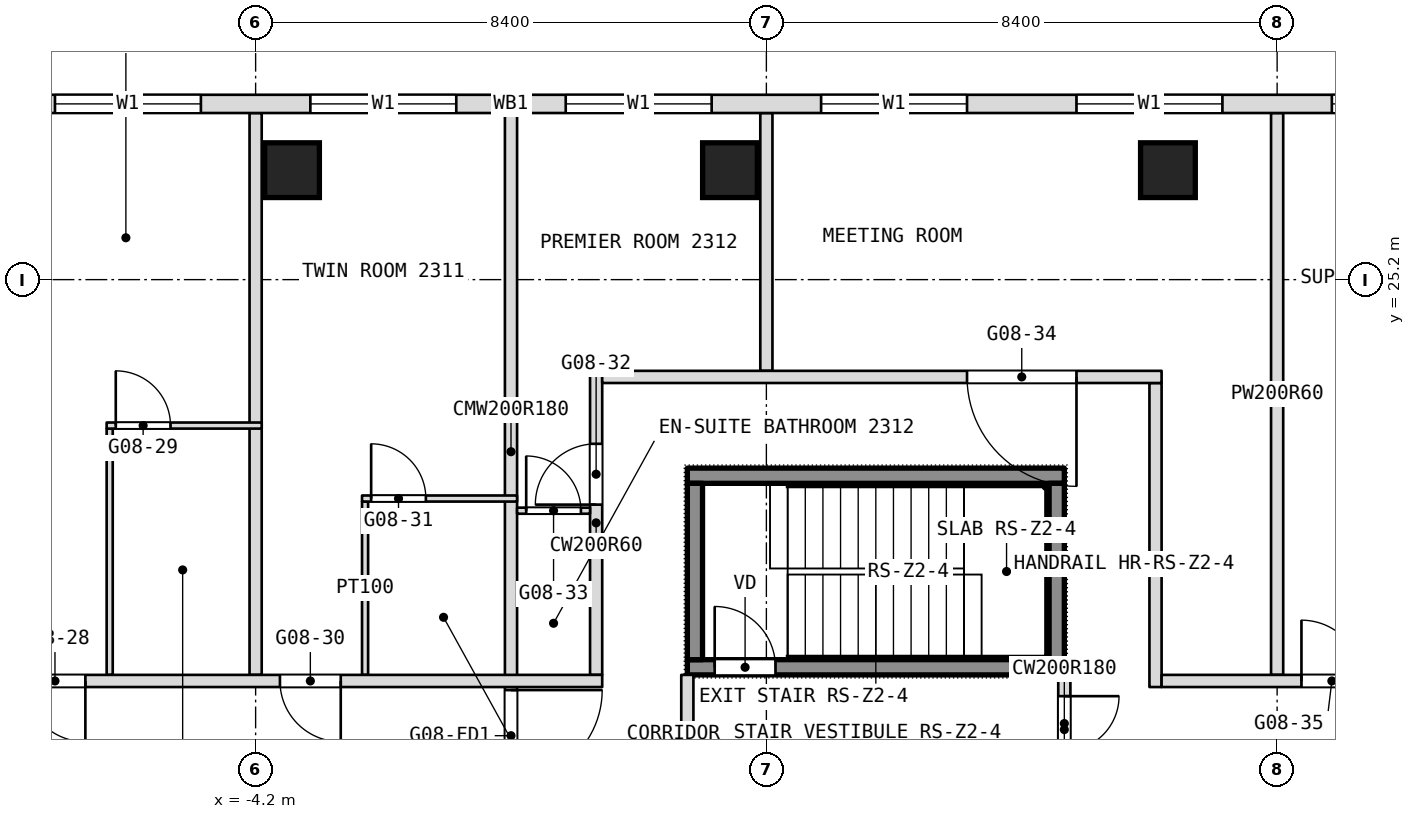
"""IFC4 building model, lengths in metres.
Left out: names, types, materials, properties, quantities, classifications, styles, units other than length and angle.
Written with IfcOpenShell. Run it as: python <this file> out.ifc"""

import sys

from ifc_helpers import new_model, si_unit, direction, frame, frame_2d, origin, origin_2d, place, context, subcontext, project, spatial, rectangle, extrude, element, fill, save


model = new_model("IFC4")
c1 = context("Model", 3, precision=1e-05, world=origin(), true_north=direction((0.0, 1.0)))
c2 = subcontext(c1, "Body", "Model", "MODEL_VIEW")
j1 = project(units=[si_unit("LENGTHUNIT", "METRE"), si_unit("PLANEANGLEUNIT", "RADIAN")], contexts=[c1])
p1 = place(None, origin())
s1 = spatial("IfcSite", under=j1, at=p1, CompositionType="ELEMENT")
p2 = place(p1, origin())
s2 = spatial("IfcBuilding", under=s1, at=p2, CompositionType="ELEMENT")
p3 = place(p2, frame((0.0, 0.0, 108.5)))
s3 = spatial("IfcBuildingStorey", under=s2, at=p3, CompositionType="ELEMENT", Elevation=108.5)
for number, where, z_axis, x_axis in (
    (1, (-3.601, 27.0, 0.0), (0.0, 0.0, 1.0), (1.0, 0.0, 0.0)),
    (2, (3.601, 27.0, 0.0), (0.0, 0.0, 1.0), (1.0, 0.0, 0.0)),
    (3, (10.804, 27.0, 0.0), (0.0, 0.0, 1.0), (1.0, 0.0, 0.0)),
):
    element("IfcColumn", number, at=place(p3, frame(where, z_axis=z_axis, x_axis=x_axis)), inside=s3, PredefinedType="COLUMN", context=c2, shape_type="SweptSolid", body=[
        extrude(rectangle(XDim=0.9, YDim=0.9, at=origin_2d()), origin(), (0.0, 0.0, 1.0), 3.6),
    ])
p4 = place(p3, frame((12.6, 18.7, 0.0), z_axis=(0.0, 0.0, 1.0), x_axis=(0.0, 1.0, 0.0)))
e4 = element("IfcWall", 4, at=p4, inside=s3, PredefinedType="PARTITIONING", context=c2, shape_type="SweptSolid", body=[
    extrude(rectangle(XDim=9.24, YDim=0.2, at=frame_2d((4.62, 0.0))), origin(), (0.0, 0.0, 1.0), 3.34),
])
p5 = place(p3, frame((10.6, 18.5, 0.0), z_axis=(0.0, 0.0, 1.0), x_axis=(0.0, 1.0, 0.0)))
e5 = element("IfcWall", 5, at=p5, inside=s3, PredefinedType="PARTITIONING", context=c2, shape_type="SweptSolid", body=[
    extrude(rectangle(XDim=5.0, YDim=0.2, at=frame_2d((2.5, 0.0))), origin(), (0.0, 0.0, 1.0), 3.34),
])
p6 = place(p3, frame((9.1, 16.9, 0.0), z_axis=(0.0, 0.0, 1.0), x_axis=(0.0, 1.0, 0.0)))
e6 = element("IfcWall", 6, at=p6, inside=s3, PredefinedType="PARTITIONING", context=c2, shape_type="SweptSolid", body=[
    extrude(rectangle(XDim=1.8, YDim=0.2, at=frame_2d((0.9, 0.0))), origin(), (0.0, 0.0, 1.0), 3.34),
])
p7 = place(p6, frame((0.55, 0.0, 0.0)))
e7 = element("IfcOpeningElement", 7, at=p7, cuts=e6, PredefinedType="OPENING", context=c2, shape_type="SweptSolid", body=[
    extrude(rectangle(XDim=0.9, YDim=2.1, at=frame_2d((0.45, 1.05))), frame((0.0, 0.1, 0.0), z_axis=(0.0, -1.0, 0.0), x_axis=(1.0, 0.0, 0.0)), (0.0, 0.0, 1.0), 0.2),
])
p8 = place(p3, frame((4.2, 23.7, 0.0), z_axis=(0.0, 0.0, 1.0), x_axis=(0.0, 1.0, 0.0)))
e8 = element("IfcWall", 8, at=p8, inside=s3, PredefinedType="PARTITIONING", context=c2, shape_type="SweptSolid", body=[
    extrude(rectangle(XDim=4.24, YDim=0.2, at=frame_2d((2.12, 0.0))), origin(), (0.0, 0.0, 1.0), 3.34),
])
p9 = place(p3, frame((2.9, 16.9, 0.0), z_axis=(0.0, 0.0, 1.0), x_axis=(0.0, 1.0, 0.0)))
e9 = element("IfcWall", 9, at=p9, inside=s3, PredefinedType="PARTITIONING", context=c2, shape_type="SweptSolid", body=[
    extrude(rectangle(XDim=1.8, YDim=0.2, at=frame_2d((0.9, 0.0))), origin(), (0.0, 0.0, 1.0), 3.34),
])
p10 = place(p3, frame((1.4, 18.7, 0.0), z_axis=(0.0, 0.0, 1.0), x_axis=(0.0, 1.0, 0.0)))
e10 = element("IfcWall", 10, at=p10, inside=s3, PredefinedType="PARTITIONING", context=c2, shape_type="SweptSolid", body=[
    extrude(rectangle(XDim=5.0, YDim=0.2, at=frame_2d((2.5, 0.0))), origin(), (0.0, 0.0, 1.0), 3.34),
])
p11 = place(p10, frame((2.8, 0.0, 0.0)))
e11 = element("IfcOpeningElement", 11, at=p11, cuts=e10, PredefinedType="OPENING", context=c2, shape_type="SweptSolid", body=[
    extrude(rectangle(XDim=1.0, YDim=2.1, at=frame_2d((0.5, 1.05))), frame((0.0, 0.1, 0.0), z_axis=(0.0, -1.0, 0.0), x_axis=(1.0, 0.0, 0.0)), (0.0, 0.0, 1.0), 0.2),
])
p12 = place(p3, frame((0.0, 16.8, 0.0), z_axis=(0.0, 0.0, 1.0), x_axis=(0.0, 1.0, 0.0)))
e12 = element("IfcWall", 12, at=p12, inside=s3, PredefinedType="PARTITIONING", context=c2, shape_type="SweptSolid", body=[
    extrude(rectangle(XDim=11.14, YDim=0.2, at=frame_2d((5.57, 0.0))), origin(), (0.0, 0.0, 1.0), 3.34),
])
p13 = place(p12, frame((0.15, 0.0, 0.0)))
e13 = element("IfcOpeningElement", 13, at=p13, cuts=e12, PredefinedType="OPENING", context=c2, shape_type="SweptSolid", body=[
    extrude(rectangle(XDim=1.5, YDim=2.1, at=frame_2d((0.75, 1.05))), frame((0.0, 0.1, 0.0), z_axis=(0.0, -1.0, 0.0), x_axis=(1.0, 0.0, 0.0)), (0.0, 0.0, 1.0), 0.2),
])
p14 = place(p3, frame((-2.4, 18.7, 0.0), z_axis=(0.0, 0.0, 1.0), x_axis=(0.0, 1.0, 0.0)))
e14 = element("IfcWall", 14, at=p14, inside=s3, PredefinedType="PARTITIONING", context=c2, shape_type="SweptSolid", body=[
    extrude(rectangle(XDim=2.85, YDim=0.1, at=frame_2d((1.425, 0.0))), origin(), (0.0, 0.0, 1.0), 3.34),
])
p15 = place(p3, frame((-4.2, 18.7, 0.0), z_axis=(0.0, 0.0, 1.0), x_axis=(0.0, 1.0, 0.0)))
e15 = element("IfcWall", 15, at=p15, inside=s3, PredefinedType="PARTITIONING", context=c2, shape_type="SweptSolid", body=[
    extrude(rectangle(XDim=9.24, YDim=0.2, at=frame_2d((4.62, 0.0))), origin(), (0.0, 0.0, 1.0), 3.34),
])
p16 = place(p3, frame((-6.6, 18.7, 0.0), z_axis=(0.0, 0.0, 1.0), x_axis=(0.0, 1.0, 0.0)))
e16 = element("IfcWall", 16, at=p16, inside=s3, PredefinedType="PARTITIONING", context=c2, shape_type="SweptSolid", body=[
    extrude(rectangle(XDim=4.05, YDim=0.1, at=frame_2d((2.025, 0.0))), origin(), (0.0, 0.0, 1.0), 3.34),
])
p17 = place(p3, frame((-16.9, 18.6, 0.0), z_axis=(0.0, 0.0, 1.0), x_axis=(1.0, 0.0, 0.0)))
e17 = element("IfcWall", 17, at=p17, inside=s3, PredefinedType="PARTITIONING", context=c2, shape_type="SweptSolid", body=[
    extrude(rectangle(XDim=18.4, YDim=0.2, at=frame_2d((9.2, 0.0))), origin(), (0.0, 0.0, 1.0), 3.34),
])
p18 = place(p17, frame((1.7, 0.0, 0.0)))
e18 = element("IfcOpeningElement", 18, at=p18, cuts=e17, PredefinedType="OPENING", context=c2, shape_type="SweptSolid", body=[
    extrude(rectangle(XDim=1.0, YDim=2.1, at=frame_2d((0.5, 1.05))), frame((0.0, 0.1, 0.0), z_axis=(0.0, -1.0, 0.0), x_axis=(1.0, 0.0, 0.0)), (0.0, 0.0, 1.0), 0.2),
])
p19 = place(p17, frame((7.1, 0.0, 0.0)))
e19 = element("IfcOpeningElement", 19, at=p19, cuts=e17, PredefinedType="OPENING", context=c2, shape_type="SweptSolid", body=[
    extrude(rectangle(XDim=1.0, YDim=2.1, at=frame_2d((0.5, 1.05))), frame((0.0, 0.1, 0.0), z_axis=(0.0, -1.0, 0.0), x_axis=(1.0, 0.0, 0.0)), (0.0, 0.0, 1.0), 0.2),
])
p20 = place(p17, frame((8.9, 0.0, 0.0)))
e20 = element("IfcOpeningElement", 20, at=p20, cuts=e17, PredefinedType="OPENING", context=c2, shape_type="SweptSolid", body=[
    extrude(rectangle(XDim=1.0, YDim=2.1, at=frame_2d((0.5, 1.05))), frame((0.0, 0.1, 0.0), z_axis=(0.0, -1.0, 0.0), x_axis=(1.0, 0.0, 0.0)), (0.0, 0.0, 1.0), 0.2),
])
p21 = place(p17, frame((13.1, 0.0, 0.0)))
e21 = element("IfcOpeningElement", 21, at=p21, cuts=e17, PredefinedType="OPENING", context=c2, shape_type="SweptSolid", body=[
    extrude(rectangle(XDim=1.0, YDim=2.1, at=frame_2d((0.5, 1.05))), frame((0.0, 0.1, 0.0), z_axis=(0.0, -1.0, 0.0), x_axis=(1.0, 0.0, 0.0)), (0.0, 0.0, 1.0), 0.2),
])
p22 = place(p3, frame((10.7, 18.6, 0.0), z_axis=(0.0, 0.0, 1.0), x_axis=(1.0, 0.0, 0.0)))
e22 = element("IfcWall", 22, at=p22, inside=s3, PredefinedType="PARTITIONING", context=c2, shape_type="SweptSolid", body=[
    extrude(rectangle(XDim=6.2, YDim=0.2, at=frame_2d((3.1, 0.0))), origin(), (0.0, 0.0, 1.0), 3.34),
])
p23 = place(p22, frame((2.3, 0.0, 0.0)))
e23 = element("IfcOpeningElement", 23, at=p23, cuts=e22, PredefinedType="OPENING", context=c2, shape_type="SweptSolid", body=[
    extrude(rectangle(XDim=1.0, YDim=2.1, at=frame_2d((0.5, 1.05))), frame((0.0, 0.1, 0.0), z_axis=(0.0, -1.0, 0.0), x_axis=(1.0, 0.0, 0.0)), (0.0, 0.0, 1.0), 0.2),
])
p24 = place(p3, frame((0.1, 21.4, 0.0), z_axis=(0.0, 0.0, 1.0), x_axis=(1.0, 0.0, 0.0)))
e24 = element("IfcWall", 24, at=p24, inside=s3, PredefinedType="PARTITIONING", context=c2, shape_type="SweptSolid", body=[
    extrude(rectangle(XDim=1.2, YDim=0.1, at=frame_2d((0.6, 0.0))), origin(), (0.0, 0.0, 1.0), 3.34),
])
p25 = place(p24, frame((0.15, 0.0, 0.0)))
e25 = element("IfcOpeningElement", 25, at=p25, cuts=e24, PredefinedType="OPENING", context=c2, shape_type="SweptSolid", body=[
    extrude(rectangle(XDim=0.9, YDim=2.1, at=frame_2d((0.45, 1.05))), frame((0.0, 0.05, 0.0), z_axis=(0.0, -1.0, 0.0), x_axis=(1.0, 0.0, 0.0)), (0.0, 0.0, 1.0), 0.1),
])
p26 = place(p3, frame((-2.45, 21.6, 0.0), z_axis=(0.0, 0.0, 1.0), x_axis=(1.0, 0.0, 0.0)))
e26 = element("IfcWall", 26, at=p26, inside=s3, PredefinedType="PARTITIONING", context=c2, shape_type="SweptSolid", body=[
    extrude(rectangle(XDim=2.55, YDim=0.1, at=frame_2d((1.275, 0.0))), origin(), (0.0, 0.0, 1.0), 3.34),
])
p27 = place(p26, frame((0.15, 0.0, 0.0)))
e27 = element("IfcOpeningElement", 27, at=p27, cuts=e26, PredefinedType="OPENING", context=c2, shape_type="SweptSolid", body=[
    extrude(rectangle(XDim=0.9, YDim=2.1, at=frame_2d((0.45, 1.05))), frame((0.0, 0.05, 0.0), z_axis=(0.0, -1.0, 0.0), x_axis=(1.0, 0.0, 0.0)), (0.0, 0.0, 1.0), 0.1),
])
p28 = place(p3, frame((-6.65, 22.8, 0.0), z_axis=(0.0, 0.0, 1.0), x_axis=(1.0, 0.0, 0.0)))
e28 = element("IfcWall", 28, at=p28, inside=s3, PredefinedType="PARTITIONING", context=c2, shape_type="SweptSolid", body=[
    extrude(rectangle(XDim=2.55, YDim=0.1, at=frame_2d((1.275, 0.0))), origin(), (0.0, 0.0, 1.0), 3.34),
])
p29 = place(p28, frame((0.15, 0.0, 0.0)))
e29 = element("IfcOpeningElement", 29, at=p29, cuts=e28, PredefinedType="OPENING", context=c2, shape_type="SweptSolid", body=[
    extrude(rectangle(XDim=0.9, YDim=2.1, at=frame_2d((0.45, 1.05))), frame((0.0, 0.05, 0.0), z_axis=(0.0, -1.0, 0.0), x_axis=(1.0, 0.0, 0.0)), (0.0, 0.0, 1.0), 0.1),
])
p30 = place(p3, frame((1.5, 23.6, 0.0), z_axis=(0.0, 0.0, 1.0), x_axis=(1.0, 0.0, 0.0)))
e30 = element("IfcWall", 30, at=p30, inside=s3, PredefinedType="PARTITIONING", context=c2, shape_type="SweptSolid", body=[
    extrude(rectangle(XDim=9.2, YDim=0.2, at=frame_2d((4.6, 0.0))), origin(), (0.0, 0.0, 1.0), 3.34),
])
p31 = place(p30, frame((6.0, 0.0, 0.0)))
e31 = element("IfcOpeningElement", 31, at=p31, cuts=e30, PredefinedType="OPENING", context=c2, shape_type="SweptSolid", body=[
    extrude(rectangle(XDim=1.8, YDim=2.1, at=frame_2d((0.9, 1.05))), frame((0.0, 0.1, 0.0), z_axis=(0.0, -1.0, 0.0), x_axis=(1.0, 0.0, 0.0)), (0.0, 0.0, 1.0), 0.2),
])
p32 = place(p3, frame((21.306, 28.09, 0.0), z_axis=(0.0, 0.0, 1.0), x_axis=(-1.0, 0.0, 0.0)))
e32 = element("IfcWall", 32, at=p32, inside=s3, PredefinedType="NOTDEFINED", context=c2, shape_type="SweptSolid", body=[
    extrude(rectangle(XDim=42.612, YDim=0.3, at=frame_2d((21.306, 0.0))), origin(), (0.0, 0.0, 1.0), 3.6),
])
p33 = place(p32, frame((5.406, 0.0, 0.9)))
e33 = element("IfcOpeningElement", 33, at=p33, cuts=e32, PredefinedType="OPENING", context=c2, shape_type="SweptSolid", body=[
    extrude(rectangle(XDim=2.4, YDim=2.1, at=frame_2d((1.2, 1.05))), frame((0.0, 0.15, 0.0), z_axis=(0.0, -1.0, 0.0), x_axis=(1.0, 0.0, 0.0)), (0.0, 0.0, 1.0), 0.3),
])
p34 = place(p32, frame((9.606, 0.0, 0.9)))
e34 = element("IfcOpeningElement", 34, at=p34, cuts=e32, PredefinedType="OPENING", context=c2, shape_type="SweptSolid", body=[
    extrude(rectangle(XDim=2.4, YDim=2.1, at=frame_2d((1.2, 1.05))), frame((0.0, 0.15, 0.0), z_axis=(0.0, -1.0, 0.0), x_axis=(1.0, 0.0, 0.0)), (0.0, 0.0, 1.0), 0.3),
])
p35 = place(p32, frame((13.806, 0.0, 0.9)))
e35 = element("IfcOpeningElement", 35, at=p35, cuts=e32, PredefinedType="OPENING", context=c2, shape_type="SweptSolid", body=[
    extrude(rectangle(XDim=2.4, YDim=2.1, at=frame_2d((1.2, 1.05))), frame((0.0, 0.15, 0.0), z_axis=(0.0, -1.0, 0.0), x_axis=(1.0, 0.0, 0.0)), (0.0, 0.0, 1.0), 0.3),
])
p36 = place(p32, frame((18.006, 0.0, 0.9)))
e36 = element("IfcOpeningElement", 36, at=p36, cuts=e32, PredefinedType="OPENING", context=c2, shape_type="SweptSolid", body=[
    extrude(rectangle(XDim=2.4, YDim=2.1, at=frame_2d((1.2, 1.05))), frame((0.0, 0.15, 0.0), z_axis=(0.0, -1.0, 0.0), x_axis=(1.0, 0.0, 0.0)), (0.0, 0.0, 1.0), 0.3),
])
p37 = place(p32, frame((22.206, 0.0, 0.9)))
e37 = element("IfcOpeningElement", 37, at=p37, cuts=e32, PredefinedType="OPENING", context=c2, shape_type="SweptSolid", body=[
    extrude(rectangle(XDim=2.4, YDim=2.1, at=frame_2d((1.2, 1.05))), frame((0.0, 0.15, 0.0), z_axis=(0.0, -1.0, 0.0), x_axis=(1.0, 0.0, 0.0)), (0.0, 0.0, 1.0), 0.3),
])
p38 = place(p32, frame((26.406, 0.0, 0.9)))
e38 = element("IfcOpeningElement", 38, at=p38, cuts=e32, PredefinedType="OPENING", context=c2, shape_type="SweptSolid", body=[
    extrude(rectangle(XDim=2.4, YDim=2.1, at=frame_2d((1.2, 1.05))), frame((0.0, 0.15, 0.0), z_axis=(0.0, -1.0, 0.0), x_axis=(1.0, 0.0, 0.0)), (0.0, 0.0, 1.0), 0.3),
])
p39 = place(p32, frame((30.606, 0.0, 0.9)))
e39 = element("IfcOpeningElement", 39, at=p39, cuts=e32, PredefinedType="OPENING", context=c2, shape_type="SweptSolid", body=[
    extrude(rectangle(XDim=2.4, YDim=2.1, at=frame_2d((1.2, 1.05))), frame((0.0, 0.15, 0.0), z_axis=(0.0, -1.0, 0.0), x_axis=(1.0, 0.0, 0.0)), (0.0, 0.0, 1.0), 0.3),
])
p40 = place(p32, frame((34.806, 0.0, 0.9)))
e40 = element("IfcOpeningElement", 40, at=p40, cuts=e32, PredefinedType="OPENING", context=c2, shape_type="SweptSolid", body=[
    extrude(rectangle(XDim=2.4, YDim=2.1, at=frame_2d((1.2, 1.05))), frame((0.0, 0.15, 0.0), z_axis=(0.0, -1.0, 0.0), x_axis=(1.0, 0.0, 0.0)), (0.0, 0.0, 1.0), 0.3),
])
p41 = place(p3, frame((2.9, 18.825, 0.1), z_axis=(0.0, 0.0, 1.0), x_axis=(1.0, 0.0, 0.0)))
e41 = element("IfcWall", 41, at=p41, inside=s3, PredefinedType="SHEAR", context=c2, shape_type="SweptSolid", body=[
    extrude(rectangle(XDim=6.2, YDim=0.25, at=frame_2d((3.1, 0.0))), origin(), (0.0, 0.0, 1.0), 3.6),
])
p42 = place(p41, frame((0.45, 0.0, 0.0)))
e42 = element("IfcOpeningElement", 42, at=p42, cuts=e41, PredefinedType="OPENING", context=c2, shape_type="SweptSolid", body=[
    extrude(rectangle(XDim=1.0, YDim=2.1, at=frame_2d((0.5, 1.05))), frame((0.0, 0.125, 0.0), z_axis=(0.0, -1.0, 0.0), x_axis=(1.0, 0.0, 0.0)), (0.0, 0.0, 1.0), 0.25),
])
p43 = place(p3, frame((2.9, 21.975, 0.1), z_axis=(0.0, 0.0, 1.0), x_axis=(1.0, 0.0, 0.0)))
e43 = element("IfcWall", 43, at=p43, inside=s3, PredefinedType="SHEAR", context=c2, shape_type="SweptSolid", body=[
    extrude(rectangle(XDim=6.2, YDim=0.25, at=frame_2d((3.1, 0.0))), origin(), (0.0, 0.0, 1.0), 3.6),
])
for number, where, z_axis, x_axis in (
    (44, (3.025, 18.95, 0.1), (0.0, 0.0, 1.0), (0.0, 1.0, 0.0)),
    (45, (8.975, 18.95, 0.1), (0.0, 0.0, 1.0), (0.0, 1.0, 0.0)),
):
    element("IfcWall", number, at=place(p3, frame(where, z_axis=z_axis, x_axis=x_axis)), inside=s3, PredefinedType="SHEAR", context=c2, shape_type="SweptSolid", body=[
        extrude(rectangle(XDim=2.9, YDim=0.25, at=frame_2d((1.45, 0.0))), origin(), (0.0, 0.0, 1.0), 3.6),
    ])
p44 = place(p7, origin())
e46 = element("IfcDoor", 46, at=p44, inside=s3, OperationType="SINGLE_SWING_RIGHT", PredefinedType="DOOR", context=c2, shape_type="SweptSolid", body=[
    extrude(rectangle(XDim=0.9, YDim=2.1, at=frame_2d((0.45, 1.05))), frame((0.0, 0.025, 0.0), z_axis=(0.0, -1.0, 0.0), x_axis=(1.0, 0.0, 0.0)), (0.0, 0.0, 1.0), 0.05),
])
fill(e7, e46)
p45 = place(p11, origin())
e47 = element("IfcDoor", 47, at=p45, inside=s3, OperationType="SINGLE_SWING_RIGHT", PredefinedType="DOOR", context=c2, shape_type="SweptSolid", body=[
    extrude(rectangle(XDim=1.0, YDim=2.1, at=frame_2d((0.5, 1.05))), frame((0.0, 0.025, 0.0), z_axis=(0.0, -1.0, 0.0), x_axis=(1.0, 0.0, 0.0)), (0.0, 0.0, 1.0), 0.05),
])
fill(e11, e47)
p46 = place(p20, origin())
e48 = element("IfcDoor", 48, at=p46, inside=s3, OperationType="SINGLE_SWING_LEFT", PredefinedType="DOOR", context=c2, shape_type="SweptSolid", body=[
    extrude(rectangle(XDim=1.0, YDim=2.1, at=frame_2d((0.5, 1.05))), frame((0.0, 0.025, 0.0), z_axis=(0.0, -1.0, 0.0), x_axis=(1.0, 0.0, 0.0)), (0.0, 0.0, 1.0), 0.05),
])
fill(e20, e48)
p47 = place(p21, origin())
e49 = element("IfcDoor", 49, at=p47, inside=s3, OperationType="SINGLE_SWING_LEFT", PredefinedType="DOOR", context=c2, shape_type="SweptSolid", body=[
    extrude(rectangle(XDim=1.0, YDim=2.1, at=frame_2d((0.5, 1.05))), frame((0.0, 0.025, 0.0), z_axis=(0.0, -1.0, 0.0), x_axis=(1.0, 0.0, 0.0)), (0.0, 0.0, 1.0), 0.05),
])
fill(e21, e49)
p48 = place(p23, origin())
e50 = element("IfcDoor", 50, at=p48, inside=s3, OperationType="SINGLE_SWING_RIGHT", PredefinedType="DOOR", context=c2, shape_type="SweptSolid", body=[
    extrude(rectangle(XDim=1.0, YDim=2.1, at=frame_2d((0.5, 1.05))), frame((0.0, 0.025, 0.0), z_axis=(0.0, -1.0, 0.0), x_axis=(1.0, 0.0, 0.0)), (0.0, 0.0, 1.0), 0.05),
])
fill(e23, e50)
p49 = place(p25, origin())
e51 = element("IfcDoor", 51, at=p49, inside=s3, OperationType="SINGLE_SWING_LEFT", PredefinedType="DOOR", context=c2, shape_type="SweptSolid", body=[
    extrude(rectangle(XDim=0.9, YDim=2.1, at=frame_2d((0.45, 1.05))), frame((0.0, 0.025, 0.0), z_axis=(0.0, -1.0, 0.0), x_axis=(1.0, 0.0, 0.0)), (0.0, 0.0, 1.0), 0.05),
])
fill(e25, e51)
p50 = place(p27, origin())
e52 = element("IfcDoor", 52, at=p50, inside=s3, OperationType="SINGLE_SWING_RIGHT", PredefinedType="DOOR", context=c2, shape_type="SweptSolid", body=[
    extrude(rectangle(XDim=0.9, YDim=2.1, at=frame_2d((0.45, 1.05))), frame((0.0, 0.025, 0.0), z_axis=(0.0, -1.0, 0.0), x_axis=(1.0, 0.0, 0.0)), (0.0, 0.0, 1.0), 0.05),
])
fill(e27, e52)
p51 = place(p29, origin())
e53 = element("IfcDoor", 53, at=p51, inside=s3, OperationType="SINGLE_SWING_RIGHT", PredefinedType="DOOR", context=c2, shape_type="SweptSolid", body=[
    extrude(rectangle(XDim=0.9, YDim=2.1, at=frame_2d((0.45, 1.05))), frame((0.0, 0.025, 0.0), z_axis=(0.0, -1.0, 0.0), x_axis=(1.0, 0.0, 0.0)), (0.0, 0.0, 1.0), 0.05),
])
fill(e29, e53)
p52 = place(p31, origin())
e54 = element("IfcDoor", 54, at=p52, inside=s3, OperationType="DOUBLE_DOOR_SINGLE_SWING", PredefinedType="DOOR", context=c2, shape_type="SweptSolid", body=[
    extrude(rectangle(XDim=1.8, YDim=2.1, at=frame_2d((0.9, 1.05))), frame((0.0, 0.025, 0.0), z_axis=(0.0, -1.0, 0.0), x_axis=(1.0, 0.0, 0.0)), (0.0, 0.0, 1.0), 0.05),
])
fill(e31, e54)
p53 = place(p33, origin())
e55 = element("IfcWindow", 55, at=p53, inside=s3, PartitioningType="SINGLE_PANEL", PredefinedType="WINDOW", context=c2, shape_type="SweptSolid", body=[
    extrude(rectangle(XDim=2.4, YDim=2.1, at=frame_2d((1.2, 1.05))), frame((0.0, 0.03, 0.0), z_axis=(0.0, -1.0, 0.0), x_axis=(1.0, 0.0, 0.0)), (0.0, 0.0, 1.0), 0.06),
])
fill(e33, e55)
p54 = place(p34, origin())
e56 = element("IfcWindow", 56, at=p54, inside=s3, PartitioningType="SINGLE_PANEL", PredefinedType="WINDOW", context=c2, shape_type="SweptSolid", body=[
    extrude(rectangle(XDim=2.4, YDim=2.1, at=frame_2d((1.2, 1.05))), frame((0.0, 0.03, 0.0), z_axis=(0.0, -1.0, 0.0), x_axis=(1.0, 0.0, 0.0)), (0.0, 0.0, 1.0), 0.06),
])
fill(e34, e56)
p55 = place(p35, origin())
e57 = element("IfcWindow", 57, at=p55, inside=s3, PartitioningType="SINGLE_PANEL", PredefinedType="WINDOW", context=c2, shape_type="SweptSolid", body=[
    extrude(rectangle(XDim=2.4, YDim=2.1, at=frame_2d((1.2, 1.05))), frame((0.0, 0.03, 0.0), z_axis=(0.0, -1.0, 0.0), x_axis=(1.0, 0.0, 0.0)), (0.0, 0.0, 1.0), 0.06),
])
fill(e35, e57)
p56 = place(p36, origin())
e58 = element("IfcWindow", 58, at=p56, inside=s3, PartitioningType="SINGLE_PANEL", PredefinedType="WINDOW", context=c2, shape_type="SweptSolid", body=[
    extrude(rectangle(XDim=2.4, YDim=2.1, at=frame_2d((1.2, 1.05))), frame((0.0, 0.03, 0.0), z_axis=(0.0, -1.0, 0.0), x_axis=(1.0, 0.0, 0.0)), (0.0, 0.0, 1.0), 0.06),
])
fill(e36, e58)
p57 = place(p37, origin())
e59 = element("IfcWindow", 59, at=p57, inside=s3, PartitioningType="SINGLE_PANEL", PredefinedType="WINDOW", context=c2, shape_type="SweptSolid", body=[
    extrude(rectangle(XDim=2.4, YDim=2.1, at=frame_2d((1.2, 1.05))), frame((0.0, 0.03, 0.0), z_axis=(0.0, -1.0, 0.0), x_axis=(1.0, 0.0, 0.0)), (0.0, 0.0, 1.0), 0.06),
])
fill(e37, e59)
p58 = place(p38, origin())
e60 = element("IfcWindow", 60, at=p58, inside=s3, PartitioningType="SINGLE_PANEL", PredefinedType="WINDOW", context=c2, shape_type="SweptSolid", body=[
    extrude(rectangle(XDim=2.4, YDim=2.1, at=frame_2d((1.2, 1.05))), frame((0.0, 0.03, 0.0), z_axis=(0.0, -1.0, 0.0), x_axis=(1.0, 0.0, 0.0)), (0.0, 0.0, 1.0), 0.06),
])
fill(e38, e60)
p59 = place(p42, origin())
e61 = element("IfcDoor", 61, at=p59, inside=s3, OperationType="SINGLE_SWING_LEFT", PredefinedType="DOOR", context=c2, shape_type="SweptSolid", body=[
    extrude(rectangle(XDim=1.0, YDim=2.1, at=frame_2d((0.5, 1.05))), frame((0.0, 0.025, 0.0), z_axis=(0.0, -1.0, 0.0), x_axis=(1.0, 0.0, 0.0)), (0.0, 0.0, 1.0), 0.05),
])
fill(e42, e61)
p60 = place(p13, origin())
e62 = element("IfcDoor", 62, at=p60, inside=s3, OperationType="DOUBLE_DOOR_DOUBLE_SWING", PredefinedType="DOOR", context=c2, shape_type="SweptSolid", body=[
    extrude(rectangle(XDim=1.5, YDim=2.1, at=frame_2d((0.75, 1.05))), frame((0.0, 0.025, 0.0), z_axis=(0.0, -1.0, 0.0), x_axis=(1.0, 0.0, 0.0)), (0.0, 0.0, 1.0), 0.05),
])
fill(e13, e62)
save(model, sys.argv[1])
